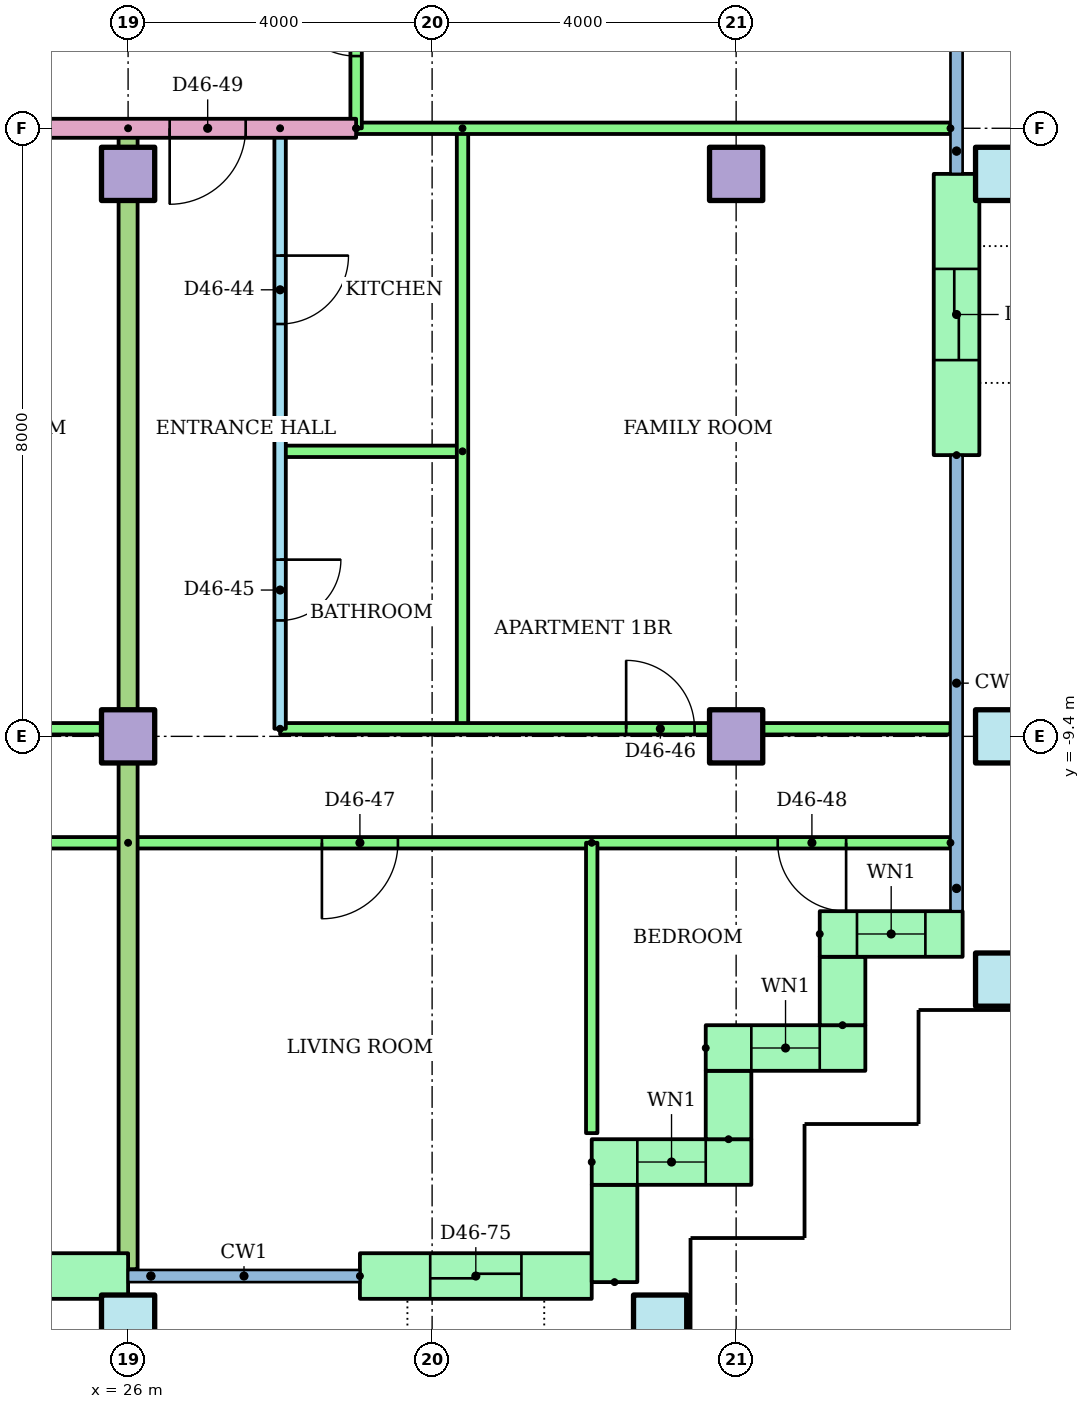
"""IFC4 building model, lengths in metres.
Left out: names, types, materials, properties, quantities, classifications, styles, units other than length and angle.
Written with IfcOpenShell. Run it as: python <this file> out.ifc"""

import sys

from ifc_helpers import new_model, si_unit, direction, frame, frame_2d, origin, origin_2d, place, context, subcontext, project, spatial, rectangle, hollow_rectangle, extrude, element, fill, save


model = new_model("IFC4")
c1 = context("Model", 3, precision=1e-05, world=origin(), true_north=direction((0.0, 1.0)))
c2 = subcontext(c1, "Body", "Model", "MODEL_VIEW")
j1 = project(units=[si_unit("LENGTHUNIT", "METRE"), si_unit("PLANEANGLEUNIT", "RADIAN")], contexts=[c1])
p1 = place(None, origin())
s1 = spatial("IfcSite", under=j1, at=p1, CompositionType="ELEMENT")
p2 = place(p1, origin())
s2 = spatial("IfcBuilding", under=s1, at=p2, CompositionType="ELEMENT")
p3 = place(p2, frame((0.0, 0.0, 178.1)))
s3 = spatial("IfcBuildingStorey", under=s2, at=p3, CompositionType="ELEMENT", Elevation=178.1)
for number, where in (
    (1, (26.0, -17.1, 0.0)),
    (2, (33.0, -17.1, 0.0)),
    (3, (37.5, -12.6, 0.0)),
):
    element("IfcColumn", number, at=place(p3, frame(where)), inside=s3, PredefinedType="COLUMN", context=c2, shape_type="SweptSolid", body=[
        extrude(hollow_rectangle(XDim=0.7, YDim=0.7, WallThickness=0.036, at=origin_2d()), origin(), (0.0, 0.0, 1.0), 3.2),
    ])
for number, where in (
    (4, (26.0, -9.4, 0.0)),
    (5, (34.0, -9.4, 0.0)),
):
    element("IfcColumn", number, at=place(p3, frame(where)), inside=s3, PredefinedType="COLUMN", context=c2, shape_type="SweptSolid", body=[
        extrude(rectangle(XDim=0.7, YDim=0.7, at=origin_2d()), origin(), (0.0, 0.0, 1.0), 3.2),
    ])
p4 = place(p3, frame((37.5, -9.4, 0.0)))
e6 = element("IfcColumn", 6, at=p4, inside=s3, PredefinedType="COLUMN", context=c2, shape_type="SweptSolid", body=[
    extrude(hollow_rectangle(XDim=0.7, YDim=0.7, WallThickness=0.036, at=origin_2d()), origin(), (0.0, 0.0, 1.0), 3.2),
])
for number, where in (
    (7, (26.0, -2.0, 0.0)),
    (8, (34.0, -2.0, 0.0)),
):
    element("IfcColumn", number, at=place(p3, frame(where)), inside=s3, PredefinedType="COLUMN", context=c2, shape_type="SweptSolid", body=[
        extrude(rectangle(XDim=0.7, YDim=0.7, at=origin_2d()), origin(), (0.0, 0.0, 1.0), 3.2),
    ])
p5 = place(p3, frame((37.5, -2.0, 0.0)))
e9 = element("IfcColumn", 9, at=p5, inside=s3, PredefinedType="COLUMN", context=c2, shape_type="SweptSolid", body=[
    extrude(hollow_rectangle(XDim=0.7, YDim=0.7, WallThickness=0.036, at=origin_2d()), origin(), (0.0, 0.0, 1.0), 3.2),
])
p6 = place(p3, frame((22.0, -16.5, 0.0)))
e10 = element("IfcWall", 10, at=p6, inside=s3, PredefinedType="STANDARD", context=c2, shape_type="SweptSolid", body=[
    extrude(rectangle(XDim=4.0, YDim=0.6, at=frame_2d((2.0, 0.0))), origin(), (0.0, 0.0, 1.0), 2.92),
])
p7 = place(p6, frame((1.4, 0.0, 0.0)))
e11 = element("IfcOpeningElement", 11, at=p7, cuts=e10, PredefinedType="OPENING", context=c2, shape_type="SweptSolid", body=[
    extrude(rectangle(XDim=1.2, YDim=2.1, at=frame_2d((0.6, 1.05))), frame((0.0, 0.31, 0.0), z_axis=(0.0, -1.0, 0.0), x_axis=(1.0, 0.0, 0.0)), (0.0, 0.0, 1.0), 0.62),
])
p8 = place(p3, frame((29.05, -16.5, 0.0)))
e12 = element("IfcWall", 12, at=p8, inside=s3, PredefinedType="STANDARD", context=c2, shape_type="SweptSolid", body=[
    extrude(rectangle(XDim=3.05, YDim=0.6, at=frame_2d((1.525, 0.0))), origin(), (0.0, 0.0, 1.0), 2.92),
])
p9 = place(p8, frame((0.925, 0.0, 0.0)))
e13 = element("IfcOpeningElement", 13, at=p9, cuts=e12, PredefinedType="OPENING", context=c2, shape_type="SweptSolid", body=[
    extrude(rectangle(XDim=1.2, YDim=2.1, at=frame_2d((0.6, 1.05))), frame((0.0, 0.31, 0.0), z_axis=(0.0, -1.0, 0.0), x_axis=(1.0, 0.0, 0.0)), (0.0, 0.0, 1.0), 0.62),
])
p10 = place(p3, frame((32.4, -16.58, 0.0), z_axis=(0.0, 0.0, 1.0), x_axis=(0.0, 1.0, 0.0)))
e14 = element("IfcWall", 14, at=p10, inside=s3, PredefinedType="STANDARD", context=c2, shape_type="SweptSolid", body=[
    extrude(rectangle(XDim=1.28, YDim=0.6, at=frame_2d((0.64, 0.0))), origin(), (0.0, 0.0, 1.0), 2.92),
])
p11 = place(p3, frame((32.1, -15.0, 0.0)))
e15 = element("IfcWall", 15, at=p11, inside=s3, PredefinedType="STANDARD", context=c2, shape_type="SweptSolid", body=[
    extrude(rectangle(XDim=2.1, YDim=0.6, at=frame_2d((1.05, 0.0))), origin(), (0.0, 0.0, 1.0), 2.92),
])
p12 = place(p11, frame((0.6, 0.0, 0.9)))
e16 = element("IfcOpeningElement", 16, at=p12, cuts=e15, PredefinedType="OPENING", context=c2, shape_type="SweptSolid", body=[
    extrude(rectangle(XDim=0.9, YDim=1.5, at=frame_2d((0.45, 0.75))), frame((0.0, 0.31, 0.0), z_axis=(0.0, -1.0, 0.0), x_axis=(1.0, 0.0, 0.0)), (0.0, 0.0, 1.0), 0.62),
])
p13 = place(p3, frame((33.9, -14.7, 0.0), z_axis=(0.0, 0.0, 1.0), x_axis=(0.0, 1.0, 0.0)))
e17 = element("IfcWall", 17, at=p13, inside=s3, PredefinedType="STANDARD", context=c2, shape_type="SweptSolid", body=[
    extrude(rectangle(XDim=0.9, YDim=0.6, at=frame_2d((0.45, 0.0))), origin(), (0.0, 0.0, 1.0), 2.92),
])
p14 = place(p3, frame((33.6, -13.5, 0.0)))
e18 = element("IfcWall", 18, at=p14, inside=s3, PredefinedType="STANDARD", context=c2, shape_type="SweptSolid", body=[
    extrude(rectangle(XDim=2.1, YDim=0.6, at=frame_2d((1.05, 0.0))), origin(), (0.0, 0.0, 1.0), 2.92),
])
p15 = place(p14, frame((0.6, 0.0, 0.9)))
e19 = element("IfcOpeningElement", 19, at=p15, cuts=e18, PredefinedType="OPENING", context=c2, shape_type="SweptSolid", body=[
    extrude(rectangle(XDim=0.9, YDim=1.5, at=frame_2d((0.45, 0.75))), frame((0.0, 0.31, 0.0), z_axis=(0.0, -1.0, 0.0), x_axis=(1.0, 0.0, 0.0)), (0.0, 0.0, 1.0), 0.62),
])
p16 = place(p3, frame((35.4, -13.2, 0.0), z_axis=(0.0, 0.0, 1.0), x_axis=(0.0, 1.0, 0.0)))
e20 = element("IfcWall", 20, at=p16, inside=s3, PredefinedType="STANDARD", context=c2, shape_type="SweptSolid", body=[
    extrude(rectangle(XDim=0.9, YDim=0.6, at=frame_2d((0.45, 0.0))), origin(), (0.0, 0.0, 1.0), 2.92),
])
p17 = place(p3, frame((35.1, -12.0, 0.0)))
e21 = element("IfcWall", 21, at=p17, inside=s3, PredefinedType="STANDARD", context=c2, shape_type="SweptSolid", body=[
    extrude(rectangle(XDim=1.88, YDim=0.6, at=frame_2d((0.94, 0.0))), origin(), (0.0, 0.0, 1.0), 2.92),
])
p18 = place(p17, frame((0.49, 0.0, 0.9)))
e22 = element("IfcOpeningElement", 22, at=p18, cuts=e21, PredefinedType="OPENING", context=c2, shape_type="SweptSolid", body=[
    extrude(rectangle(XDim=0.9, YDim=1.5, at=frame_2d((0.45, 0.75))), frame((0.0, 0.31, 0.0), z_axis=(0.0, -1.0, 0.0), x_axis=(1.0, 0.0, 0.0)), (0.0, 0.0, 1.0), 0.62),
])
p19 = place(p3, frame((36.9, -5.7, 0.0), z_axis=(0.0, 0.0, 1.0), x_axis=(0.0, 1.0, 0.0)))
e23 = element("IfcWall", 23, at=p19, inside=s3, PredefinedType="STANDARD", context=c2, shape_type="SweptSolid", body=[
    extrude(rectangle(XDim=3.7, YDim=0.6, at=frame_2d((1.85, 0.0))), origin(), (0.0, 0.0, 1.0), 2.92),
])
p20 = place(p19, frame((1.25, 0.0, 0.0)))
e24 = element("IfcOpeningElement", 24, at=p20, cuts=e23, PredefinedType="OPENING", context=c2, shape_type="SweptSolid", body=[
    extrude(rectangle(XDim=1.2, YDim=2.1, at=frame_2d((0.6, 1.05))), frame((0.0, 0.31, 0.0), z_axis=(0.0, -1.0, 0.0), x_axis=(1.0, 0.0, 0.0)), (0.0, 0.0, 1.0), 0.62),
])
p21 = place(p3, frame((20.0, -9.3, 0.0)))
e25 = element("IfcWall", 25, at=p21, inside=s3, PredefinedType="PARTITIONING", context=c2, shape_type="SweptSolid", body=[
    extrude(rectangle(XDim=6.0, YDim=0.15, at=frame_2d((3.0, 0.0))), origin(), (0.0, 0.0, 1.0), 2.4),
])
p22 = place(p21, frame((3.75, 0.0, 0.0)))
e26 = element("IfcOpeningElement", 26, at=p22, cuts=e25, PredefinedType="OPENING", context=c2, shape_type="SweptSolid", body=[
    extrude(rectangle(XDim=0.9, YDim=2.1, at=frame_2d((0.45, 1.05))), frame((0.0, 0.085, 0.0), z_axis=(0.0, -1.0, 0.0), x_axis=(1.0, 0.0, 0.0)), (0.0, 0.0, 1.0), 0.17),
])
p23 = place(p3, frame((26.0, -10.8, 0.0), z_axis=(0.0, 0.0, 1.0), x_axis=(-1.0, 0.0, 0.0)))
e27 = element("IfcWall", 27, at=p23, inside=s3, PredefinedType="PARTITIONING", context=c2, shape_type="SweptSolid", body=[
    extrude(rectangle(XDim=8.0, YDim=0.15, at=frame_2d((4.0, 0.0))), origin(), (0.0, 0.0, 1.0), 2.4),
])
p24 = place(p23, frame((5.55, 0.0, 0.0)))
e28 = element("IfcOpeningElement", 28, at=p24, cuts=e27, PredefinedType="OPENING", context=c2, shape_type="SweptSolid", body=[
    extrude(rectangle(XDim=0.9, YDim=2.1, at=frame_2d((0.45, 1.05))), frame((0.0, 0.085, 0.0), z_axis=(0.0, -1.0, 0.0), x_axis=(1.0, 0.0, 0.0)), (0.0, 0.0, 1.0), 0.17),
])
p25 = place(p23, frame((1.5, 0.0, 0.0)))
e29 = element("IfcOpeningElement", 29, at=p25, cuts=e27, PredefinedType="OPENING", context=c2, shape_type="SweptSolid", body=[
    extrude(rectangle(XDim=1.0, YDim=2.1, at=frame_2d((0.5, 1.05))), frame((0.0, 0.085, 0.0), z_axis=(0.0, -1.0, 0.0), x_axis=(1.0, 0.0, 0.0)), (0.0, 0.0, 1.0), 0.17),
])
p26 = place(p3, frame((28.0, -1.4, 0.0), z_axis=(0.0, 0.0, 1.0), x_axis=(0.0, -1.0, 0.0)))
e30 = element("IfcWall", 30, at=p26, inside=s3, PredefinedType="PARTITIONING", context=c2, shape_type="SweptSolid", body=[
    extrude(rectangle(XDim=7.9, YDim=0.15, at=frame_2d((3.95, 0.0))), origin(), (0.0, 0.0, 1.0), 2.4),
])
p27 = place(p26, frame((1.675, 0.0, 0.0)))
e31 = element("IfcOpeningElement", 31, at=p27, cuts=e30, PredefinedType="OPENING", context=c2, shape_type="SweptSolid", body=[
    extrude(rectangle(XDim=0.9, YDim=2.1, at=frame_2d((0.45, 1.05))), frame((0.0, 0.085, 0.0), z_axis=(0.0, -1.0, 0.0), x_axis=(1.0, 0.0, 0.0)), (0.0, 0.0, 1.0), 0.17),
])
p28 = place(p26, frame((5.675, 0.0, 0.0)))
e32 = element("IfcOpeningElement", 32, at=p28, cuts=e30, PredefinedType="OPENING", context=c2, shape_type="SweptSolid", body=[
    extrude(rectangle(XDim=0.8, YDim=2.1, at=frame_2d((0.4, 1.05))), frame((0.0, 0.085, 0.0), z_axis=(0.0, -1.0, 0.0), x_axis=(1.0, 0.0, 0.0)), (0.0, 0.0, 1.0), 0.17),
])
p29 = place(p3, frame((30.4, -5.65, 0.0), z_axis=(0.0, 0.0, 1.0), x_axis=(-1.0, 0.0, 0.0)))
e33 = element("IfcWall", 33, at=p29, inside=s3, PredefinedType="PARTITIONING", context=c2, shape_type="SweptSolid", body=[
    extrude(rectangle(XDim=2.4, YDim=0.15, at=frame_2d((1.2, 0.0))), origin(), (0.0, 0.0, 1.0), 2.4),
])
p30 = place(p3, frame((30.4, -1.4, 0.0), z_axis=(0.0, 0.0, 1.0), x_axis=(0.0, -1.0, 0.0)))
e34 = element("IfcWall", 34, at=p30, inside=s3, PredefinedType="PARTITIONING", context=c2, shape_type="SweptSolid", body=[
    extrude(rectangle(XDim=7.9, YDim=0.15, at=frame_2d((3.95, 0.0))), origin(), (0.0, 0.0, 1.0), 2.4),
])
p31 = place(p3, frame((28.0, -9.3, 0.0)))
e35 = element("IfcWall", 35, at=p31, inside=s3, PredefinedType="PARTITIONING", context=c2, shape_type="SweptSolid", body=[
    extrude(rectangle(XDim=8.82, YDim=0.15, at=frame_2d((4.41, 0.0))), origin(), (0.0, 0.0, 1.0), 2.4),
])
p32 = place(p31, frame((4.553, 0.0, 0.0)))
e36 = element("IfcOpeningElement", 36, at=p32, cuts=e35, PredefinedType="OPENING", context=c2, shape_type="SweptSolid", body=[
    extrude(rectangle(XDim=0.9, YDim=2.1, at=frame_2d((0.45, 1.05))), frame((0.0, 0.085, 0.0), z_axis=(0.0, -1.0, 0.0), x_axis=(1.0, 0.0, 0.0)), (0.0, 0.0, 1.0), 0.17),
])
p33 = place(p3, frame((36.82, -10.8, 0.0), z_axis=(0.0, 0.0, 1.0), x_axis=(-1.0, 0.0, 0.0)))
e37 = element("IfcWall", 37, at=p33, inside=s3, PredefinedType="PARTITIONING", context=c2, shape_type="SweptSolid", body=[
    extrude(rectangle(XDim=10.82, YDim=0.15, at=frame_2d((5.41, 0.0))), origin(), (0.0, 0.0, 1.0), 2.4),
])
p34 = place(p33, frame((7.27, 0.0, 0.0)))
e38 = element("IfcOpeningElement", 38, at=p34, cuts=e37, PredefinedType="OPENING", context=c2, shape_type="SweptSolid", body=[
    extrude(rectangle(XDim=1.0, YDim=2.1, at=frame_2d((0.5, 1.05))), frame((0.0, 0.085, 0.0), z_axis=(0.0, -1.0, 0.0), x_axis=(1.0, 0.0, 0.0)), (0.0, 0.0, 1.0), 0.17),
])
p35 = place(p33, frame((1.373, 0.0, 0.0)))
e39 = element("IfcOpeningElement", 39, at=p35, cuts=e37, PredefinedType="OPENING", context=c2, shape_type="SweptSolid", body=[
    extrude(rectangle(XDim=0.9, YDim=2.1, at=frame_2d((0.45, 1.05))), frame((0.0, 0.085, 0.0), z_axis=(0.0, -1.0, 0.0), x_axis=(1.0, 0.0, 0.0)), (0.0, 0.0, 1.0), 0.17),
])
p36 = place(p3, frame((32.1, -10.8, 0.0), z_axis=(0.0, 0.0, 1.0), x_axis=(0.0, -1.0, 0.0)))
e40 = element("IfcWall", 40, at=p36, inside=s3, PredefinedType="PARTITIONING", context=c2, shape_type="SweptSolid", body=[
    extrude(rectangle(XDim=3.82, YDim=0.15, at=frame_2d((1.91, 0.0))), origin(), (0.0, 0.0, 1.0), 2.4),
])
p37 = place(p3, frame((26.0, -1.4, 0.0), z_axis=(0.0, 0.0, 1.0), x_axis=(0.0, -1.0, 0.0)))
e41 = element("IfcWall", 41, at=p37, inside=s3, PredefinedType="PARTITIONING", context=c2, shape_type="SweptSolid", body=[
    extrude(rectangle(XDim=15.01, YDim=0.25, at=frame_2d((7.505, 0.0))), origin(), (0.0, 0.0, 1.0), 2.4),
])
p38 = place(p3, frame((29.0, -1.4, 0.0), z_axis=(0.0, 0.0, 1.0), x_axis=(-1.0, 0.0, 0.0)))
e42 = element("IfcWall", 42, at=p38, inside=s3, PredefinedType="PARTITIONING", context=c2, shape_type="SweptSolid", body=[
    extrude(rectangle(XDim=15.0, YDim=0.25, at=frame_2d((7.5, 0.0))), origin(), (0.0, 0.0, 1.0), 2.4),
])
p39 = place(p38, frame((9.453, 0.0, 0.0)))
e43 = element("IfcOpeningElement", 43, at=p39, cuts=e42, PredefinedType="OPENING", context=c2, shape_type="SweptSolid", body=[
    extrude(rectangle(XDim=1.0, YDim=2.1, at=frame_2d((0.5, 1.05))), frame((0.0, 0.135, 0.0), z_axis=(0.0, -1.0, 0.0), x_axis=(1.0, 0.0, 0.0)), (0.0, 0.0, 1.0), 0.27),
])
p40 = place(p38, frame((1.453, 0.0, 0.0)))
e44 = element("IfcOpeningElement", 44, at=p40, cuts=e42, PredefinedType="OPENING", context=c2, shape_type="SweptSolid", body=[
    extrude(rectangle(XDim=1.0, YDim=2.1, at=frame_2d((0.5, 1.05))), frame((0.0, 0.135, 0.0), z_axis=(0.0, -1.0, 0.0), x_axis=(1.0, 0.0, 0.0)), (0.0, 0.0, 1.0), 0.27),
])
p41 = place(p3, frame((36.82, -1.4, 0.0), z_axis=(0.0, 0.0, 1.0), x_axis=(-1.0, 0.0, 0.0)))
e45 = element("IfcWall", 45, at=p41, inside=s3, PredefinedType="PARTITIONING", context=c2, shape_type="SweptSolid", body=[
    extrude(rectangle(XDim=7.82, YDim=0.15, at=frame_2d((3.91, 0.0))), origin(), (0.0, 0.0, 1.0), 2.4),
])
p42 = place(p3, frame((29.0, -1.4, 0.0), z_axis=(0.0, 0.0, 1.0), x_axis=(0.0, 1.0, 0.0)))
e46 = element("IfcWall", 46, at=p42, inside=s3, PredefinedType="PARTITIONING", context=c2, shape_type="SweptSolid", body=[
    extrude(rectangle(XDim=2.8, YDim=0.15, at=frame_2d((1.4, 0.0))), origin(), (0.0, 0.0, 1.0), 2.4),
])
p43 = place(p42, frame((0.95, 0.0, 0.0)))
e47 = element("IfcOpeningElement", 47, at=p43, cuts=e46, PredefinedType="OPENING", context=c2, shape_type="SweptSolid", body=[
    extrude(rectangle(XDim=0.9, YDim=2.1, at=frame_2d((0.45, 1.05))), frame((0.0, 0.085, 0.0), z_axis=(0.0, -1.0, 0.0), x_axis=(1.0, 0.0, 0.0)), (0.0, 0.0, 1.0), 0.17),
])
p44 = place(p12, origin())
e48 = element("IfcWindow", 48, at=p44, inside=s3, PartitioningType="SINGLE_PANEL", PredefinedType="WINDOW", context=c2, shape_type="SweptSolid", body=[
    extrude(rectangle(XDim=0.9, YDim=1.5, at=frame_2d((0.45, 0.75))), frame((0.0, 0.03, 0.0), z_axis=(0.0, -1.0, 0.0), x_axis=(1.0, 0.0, 0.0)), (0.0, 0.0, 1.0), 0.06),
])
fill(e16, e48)
p45 = place(p15, origin())
e49 = element("IfcWindow", 49, at=p45, inside=s3, PartitioningType="SINGLE_PANEL", PredefinedType="WINDOW", context=c2, shape_type="SweptSolid", body=[
    extrude(rectangle(XDim=0.9, YDim=1.5, at=frame_2d((0.45, 0.75))), frame((0.0, 0.03, 0.0), z_axis=(0.0, -1.0, 0.0), x_axis=(1.0, 0.0, 0.0)), (0.0, 0.0, 1.0), 0.06),
])
fill(e19, e49)
p46 = place(p18, origin())
e50 = element("IfcWindow", 50, at=p46, inside=s3, PartitioningType="SINGLE_PANEL", PredefinedType="WINDOW", context=c2, shape_type="SweptSolid", body=[
    extrude(rectangle(XDim=0.9, YDim=1.5, at=frame_2d((0.45, 0.75))), frame((0.0, 0.03, 0.0), z_axis=(0.0, -1.0, 0.0), x_axis=(1.0, 0.0, 0.0)), (0.0, 0.0, 1.0), 0.06),
])
fill(e22, e50)
p47 = place(p27, origin())
e51 = element("IfcDoor", 51, at=p47, inside=s3, OperationType="SINGLE_SWING_LEFT", PredefinedType="DOOR", context=c2, shape_type="SweptSolid", body=[
    extrude(rectangle(XDim=0.9, YDim=2.1, at=frame_2d((0.45, 1.05))), frame((0.0, 0.025, 0.0), z_axis=(0.0, -1.0, 0.0), x_axis=(1.0, 0.0, 0.0)), (0.0, 0.0, 1.0), 0.05),
])
fill(e31, e51)
p48 = place(p28, origin())
e52 = element("IfcDoor", 52, at=p48, inside=s3, OperationType="SINGLE_SWING_LEFT", PredefinedType="DOOR", context=c2, shape_type="SweptSolid", body=[
    extrude(rectangle(XDim=0.8, YDim=2.1, at=frame_2d((0.4, 1.05))), frame((0.0, 0.025, 0.0), z_axis=(0.0, -1.0, 0.0), x_axis=(1.0, 0.0, 0.0)), (0.0, 0.0, 1.0), 0.05),
])
fill(e32, e52)
p49 = place(p32, origin())
e53 = element("IfcDoor", 53, at=p49, inside=s3, OperationType="SINGLE_SWING_LEFT", PredefinedType="DOOR", context=c2, shape_type="SweptSolid", body=[
    extrude(rectangle(XDim=0.9, YDim=2.1, at=frame_2d((0.45, 1.05))), frame((0.0, 0.025, 0.0), z_axis=(0.0, -1.0, 0.0), x_axis=(1.0, 0.0, 0.0)), (0.0, 0.0, 1.0), 0.05),
])
fill(e36, e53)
p50 = place(p34, origin())
e54 = element("IfcDoor", 54, at=p50, inside=s3, OperationType="SINGLE_SWING_RIGHT", PredefinedType="DOOR", context=c2, shape_type="SweptSolid", body=[
    extrude(rectangle(XDim=1.0, YDim=2.1, at=frame_2d((0.5, 1.05))), frame((0.0, 0.025, 0.0), z_axis=(0.0, -1.0, 0.0), x_axis=(1.0, 0.0, 0.0)), (0.0, 0.0, 1.0), 0.05),
])
fill(e38, e54)
p51 = place(p35, origin())
e55 = element("IfcDoor", 55, at=p51, inside=s3, OperationType="SINGLE_SWING_LEFT", PredefinedType="DOOR", context=c2, shape_type="SweptSolid", body=[
    extrude(rectangle(XDim=0.9, YDim=2.1, at=frame_2d((0.45, 1.05))), frame((0.0, 0.025, 0.0), z_axis=(0.0, -1.0, 0.0), x_axis=(1.0, 0.0, 0.0)), (0.0, 0.0, 1.0), 0.05),
])
fill(e39, e55)
p52 = place(p40, origin())
e56 = element("IfcDoor", 56, at=p52, inside=s3, OperationType="SINGLE_SWING_RIGHT", PredefinedType="DOOR", context=c2, shape_type="SweptSolid", body=[
    extrude(rectangle(XDim=1.0, YDim=2.1, at=frame_2d((0.5, 1.05))), frame((0.0, 0.025, 0.0), z_axis=(0.0, -1.0, 0.0), x_axis=(1.0, 0.0, 0.0)), (0.0, 0.0, 1.0), 0.05),
])
fill(e44, e56)
p53 = place(p43, origin())
e57 = element("IfcDoor", 57, at=p53, inside=s3, OperationType="SINGLE_SWING_RIGHT", PredefinedType="DOOR", context=c2, shape_type="SweptSolid", body=[
    extrude(rectangle(XDim=0.9, YDim=2.1, at=frame_2d((0.45, 1.05))), frame((0.0, 0.025, 0.0), z_axis=(0.0, -1.0, 0.0), x_axis=(1.0, 0.0, 0.0)), (0.0, 0.0, 1.0), 0.05),
])
fill(e47, e57)
p54 = place(p9, origin())
e58 = element("IfcDoor", 58, at=p54, inside=s3, OperationType="SLIDING_TO_LEFT", PredefinedType="DOOR", context=c2, shape_type="SweptSolid", body=[
    extrude(rectangle(XDim=1.2, YDim=2.1, at=frame_2d((0.6, 1.05))), frame((0.0, 0.025, 0.0), z_axis=(0.0, -1.0, 0.0), x_axis=(1.0, 0.0, 0.0)), (0.0, 0.0, 1.0), 0.05),
])
fill(e13, e58)
p55 = place(p20, origin())
e59 = element("IfcDoor", 59, at=p55, inside=s3, OperationType="SLIDING_TO_LEFT", PredefinedType="DOOR", context=c2, shape_type="SweptSolid", body=[
    extrude(rectangle(XDim=1.2, YDim=2.1, at=frame_2d((0.6, 1.05))), frame((0.0, 0.025, 0.0), z_axis=(0.0, -1.0, 0.0), x_axis=(1.0, 0.0, 0.0)), (0.0, 0.0, 1.0), 0.05),
])
fill(e24, e59)
save(model, sys.argv[1])
